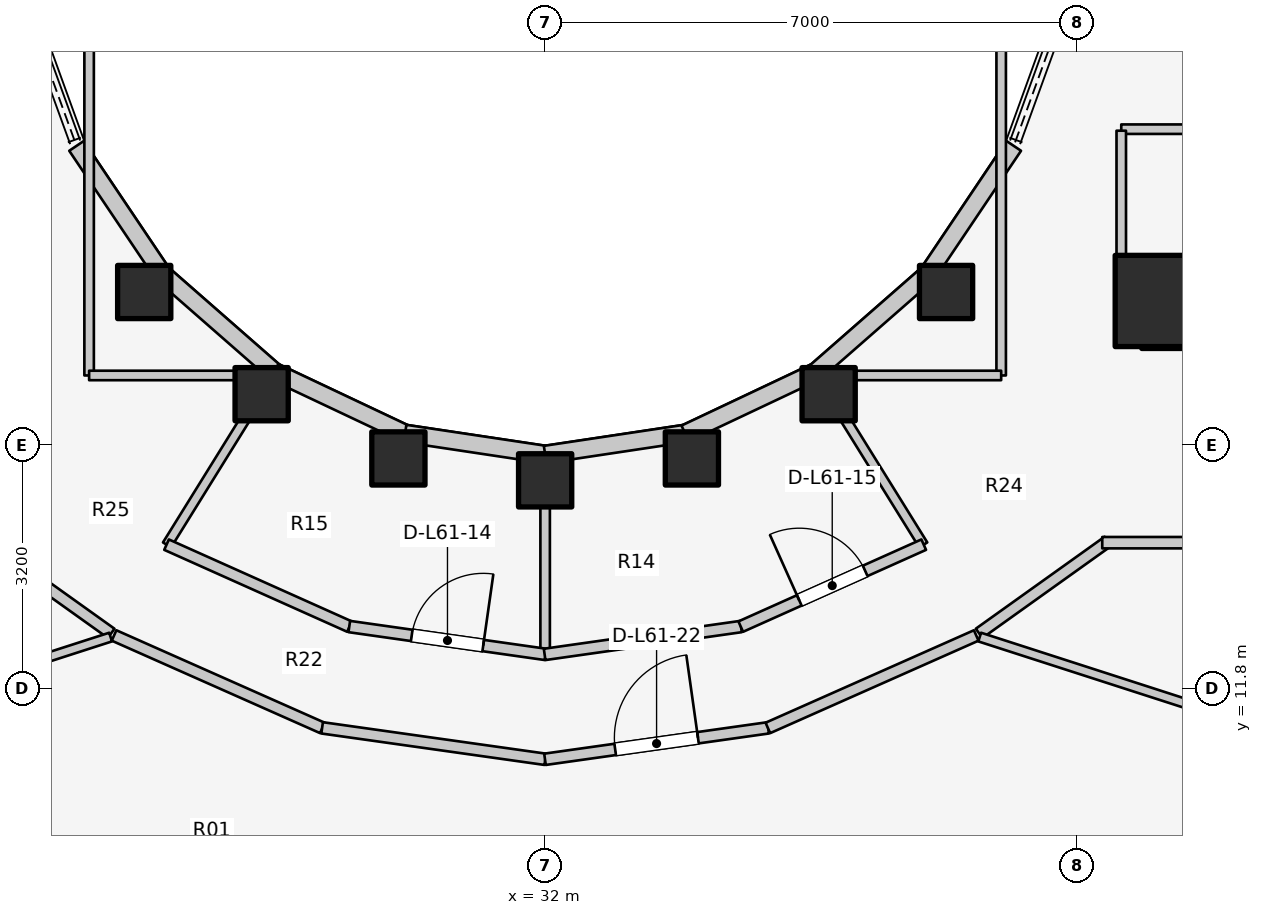
"""IFC4 building model, lengths in metres.
Left out: names, types, materials, properties, quantities, classifications, styles, units other than length and angle.
Written with IfcOpenShell. Run it as: python <this file> out.ifc"""

import sys

from ifc_helpers import new_model, si_unit, direction, frame, frame_2d, origin, origin_2d, place, context, subcontext, project, spatial, rectangle, extrude, element, fill, save


model = new_model("IFC4")
c1 = context("Model", 3, precision=1e-05, world=origin(), true_north=direction((0.0, 1.0)))
c2 = subcontext(c1, "Body", "Model", "MODEL_VIEW")
j1 = project(units=[si_unit("LENGTHUNIT", "METRE"), si_unit("PLANEANGLEUNIT", "RADIAN")], contexts=[c1])
p1 = place(None, origin())
s1 = spatial("IfcSite", under=j1, at=p1, CompositionType="ELEMENT")
p2 = place(p1, origin())
s2 = spatial("IfcBuilding", under=s1, at=p2, CompositionType="ELEMENT")
p3 = place(p2, frame((0.0, 0.0, 201.6)))
s3 = spatial("IfcBuildingStorey", under=s2, at=p3, CompositionType="ELEMENT", Elevation=201.6)
p4 = place(p3, frame((39.85, 16.55, 0.0), z_axis=(0.0, 0.0, 1.0), x_axis=(1.0, 0.0, 0.0)))
e1 = element("IfcWall", 1, at=p4, inside=s3, PredefinedType="SHEAR", context=c2, shape_type="SweptSolid", body=[
    extrude(rectangle(XDim=4.5, YDim=0.55, at=frame_2d((2.25, 0.0))), origin(), (0.0, 0.0, 1.0), 3.1),
])
p5 = place(p3, frame((40.1, 16.9, 0.0), z_axis=(0.0, 0.0, 1.0), x_axis=(1.0, 0.0, 0.0)))
e2 = element("IfcColumn", 2, at=p5, inside=s3, PredefinedType="COLUMN", context=c2, shape_type="SweptSolid", body=[
    extrude(rectangle(XDim=1.2, YDim=1.2, at=origin_2d()), origin(), (0.0, 0.0, 1.0), 3.1),
])
for number, where, z_axis, x_axis in (
    (3, (26.725, 17.018, 0.0), (0.0, 0.0, 1.0), (1.0, 0.0, 0.0)),
    (4, (28.27, 15.673, 0.0), (0.0, 0.0, 1.0), (1.0, 0.0, 0.0)),
    (5, (30.069, 14.828, 0.0), (0.0, 0.0, 1.0), (1.0, 0.0, 0.0)),
    (6, (32.0, 14.54, 0.0), (0.0, 0.0, 1.0), (1.0, 0.0, 0.0)),
    (7, (33.931, 14.828, 0.0), (0.0, 0.0, 1.0), (1.0, 0.0, 0.0)),
    (8, (35.73, 15.673, 0.0), (0.0, 0.0, 1.0), (1.0, 0.0, 0.0)),
    (9, (37.275, 17.018, 0.0), (0.0, 0.0, 1.0), (1.0, 0.0, 0.0)),
):
    element("IfcColumn", number, at=place(p3, frame(where, z_axis=z_axis, x_axis=x_axis)), inside=s3, PredefinedType="COLUMN", context=c2, shape_type="SweptSolid", body=[
        extrude(rectangle(XDim=0.7, YDim=0.7, at=origin_2d()), origin(), (0.0, 0.0, 1.0), 3.1),
    ])
p6 = place(p3, frame((25.834, 18.94, 0.0), z_axis=(0.0, 0.0, 1.0), x_axis=(0.558197800898, -0.829707909492, 0.0)))
e10 = element("IfcWall", 10, at=p6, inside=s3, PredefinedType="STANDARD", context=c2, shape_type="SweptSolid", body=[
    extrude(rectangle(XDim=2.027, YDim=0.23, at=frame_2d((1.013, 0.0))), origin(), (0.0, 0.0, 1.0), 2.16),
])
p7 = place(p3, frame((26.965, 17.258, 0.0), z_axis=(0.0, 0.0, 1.0), x_axis=(0.752576694707, -0.658504607869, 0.0)))
e11 = element("IfcWall", 11, at=p7, inside=s3, PredefinedType="STANDARD", context=c2, shape_type="SweptSolid", body=[
    extrude(rectangle(XDim=1.959, YDim=0.23, at=frame_2d((0.98, 0.0))), origin(), (0.0, 0.0, 1.0), 2.16),
])
p8 = place(p3, frame((28.44, 15.968, 0.0), z_axis=(0.0, 0.0, 1.0), x_axis=(0.904179699603, -0.427152280606, 0.0)))
e12 = element("IfcWall", 12, at=p8, inside=s3, PredefinedType="STANDARD", context=c2, shape_type="SweptSolid", body=[
    extrude(rectangle(XDim=1.899, YDim=0.23, at=frame_2d((0.95, 0.0))), origin(), (0.0, 0.0, 1.0), 2.16),
])
for number, where, z_axis, x_axis in (
    (13, (30.157, 15.157, 0.0), (0.0, 0.0, 1.0), (0.989, -0.149, 0.0)),
    (14, (32.0, 14.88, 0.0), (0.0, 0.0, 1.0), (0.989, 0.149, 0.0)),
):
    element("IfcWall", number, at=place(p3, frame(where, z_axis=z_axis, x_axis=x_axis)), inside=s3, PredefinedType="STANDARD", context=c2, shape_type="SweptSolid", body=[
        extrude(rectangle(XDim=1.864, YDim=0.23, at=frame_2d((0.932, 0.0))), origin(), (0.0, 0.0, 1.0), 2.16),
    ])
p9 = place(p3, frame((33.843, 15.157, 0.0), z_axis=(0.0, 0.0, 1.0), x_axis=(0.904179699603, 0.427152280606, 0.0)))
e15 = element("IfcWall", 15, at=p9, inside=s3, PredefinedType="STANDARD", context=c2, shape_type="SweptSolid", body=[
    extrude(rectangle(XDim=1.899, YDim=0.23, at=frame_2d((0.95, 0.0))), origin(), (0.0, 0.0, 1.0), 2.16),
])
p10 = place(p3, frame((35.56, 15.968, 0.0), z_axis=(0.0, 0.0, 1.0), x_axis=(0.752576694707, 0.658504607869, 0.0)))
e16 = element("IfcWall", 16, at=p10, inside=s3, PredefinedType="STANDARD", context=c2, shape_type="SweptSolid", body=[
    extrude(rectangle(XDim=1.959, YDim=0.23, at=frame_2d((0.98, 0.0))), origin(), (0.0, 0.0, 1.0), 2.16),
])
p11 = place(p3, frame((37.035, 17.258, 0.0), z_axis=(0.0, 0.0, 1.0), x_axis=(0.558197800898, 0.829707909492, 0.0)))
e17 = element("IfcWall", 17, at=p11, inside=s3, PredefinedType="STANDARD", context=c2, shape_type="SweptSolid", body=[
    extrude(rectangle(XDim=2.027, YDim=0.23, at=frame_2d((1.013, 0.0))), origin(), (0.0, 0.0, 1.0), 2.16),
])
p12 = place(p3, frame((39.043, 8.515, 0.0), z_axis=(0.0, 0.0, 1.0), x_axis=(0.965213026382, 0.261464746576, 0.0)))
e18 = element("IfcWall", 18, at=p12, inside=s3, PredefinedType="STANDARD", context=c2, shape_type="SweptSolid", body=[
    extrude(rectangle(XDim=5.001, YDim=0.26, at=frame_2d((2.5, 0.0))), origin(), (0.0, 0.0, 1.0), 2.85),
])
p13 = place(p12, frame((1.75, 0.0, 0.75)))
e19 = element("IfcOpeningElement", 19, at=p13, cuts=e18, PredefinedType="OPENING", context=c2, shape_type="SweptSolid", body=[
    extrude(rectangle(XDim=1.5, YDim=1.6, at=frame_2d((0.75, 0.8))), frame((0.0, 0.14, 0.0), z_axis=(0.0, -1.0, 0.0), x_axis=(1.0, 0.0, 0.0)), (0.0, 0.0, 1.0), 0.28),
])
p14 = place(p3, frame((39.58, 19.16, 0.0), z_axis=(0.0, 0.0, 1.0), x_axis=(1.0, 0.0, 0.0)))
e20 = element("IfcWall", 20, at=p14, inside=s3, PredefinedType="PARTITIONING", context=c2, shape_type="SweptSolid", body=[
    extrude(rectangle(XDim=4.87, YDim=0.125, at=frame_2d((2.435, 0.0))), origin(), (0.0, 0.0, 1.0), 2.12),
])
p15 = place(p14, frame((1.748, 0.0, 0.0)))
e21 = element("IfcOpeningElement", 21, at=p15, cuts=e20, PredefinedType="OPENING", context=c2, shape_type="SweptSolid", body=[
    extrude(rectangle(XDim=0.85, YDim=2.05, at=frame_2d((0.425, 1.025))), frame((0.0, 0.073, 0.0), z_axis=(0.0, -1.0, 0.0), x_axis=(1.0, 0.0, 0.0)), (0.0, 0.0, 1.0), 0.145),
])
p16 = place(p3, frame((39.58, 17.1, 0.0), z_axis=(0.0, 0.0, 1.0), x_axis=(0.0, 1.0, 0.0)))
e22 = element("IfcWall", 22, at=p16, inside=s3, PredefinedType="PARTITIONING", context=c2, shape_type="SweptSolid", body=[
    extrude(rectangle(XDim=2.04, YDim=0.125, at=frame_2d((1.02, 0.0))), origin(), (0.0, 0.0, 1.0), 2.232),
])
p17 = place(p3, frame((28.45, 15.985, 0.0), z_axis=(0.0, 0.0, 1.0), x_axis=(-0.527527080983, -0.849538215049, 0.0)))
e23 = element("IfcWall", 23, at=p17, inside=s3, PredefinedType="PARTITIONING", context=c2, shape_type="SweptSolid", body=[
    extrude(rectangle(XDim=2.701, YDim=0.125, at=frame_2d((1.351, 0.0))), origin(), (0.0, 0.0, 1.0), 2.376),
])
p18 = place(p3, frame((32.0, 14.9, 0.0), z_axis=(0.0, 0.0, 1.0), x_axis=(0.0, -1.0, 0.0)))
e24 = element("IfcWall", 24, at=p18, inside=s3, PredefinedType="PARTITIONING", context=c2, shape_type="SweptSolid", body=[
    extrude(rectangle(XDim=2.65, YDim=0.125, at=frame_2d((1.325, 0.0))), origin(), (0.0, 0.0, 1.0), 2.376),
])
p19 = place(p3, frame((35.55, 15.985, 0.0), z_axis=(0.0, 0.0, 1.0), x_axis=(0.527527080983, -0.849538215049, 0.0)))
e25 = element("IfcWall", 25, at=p19, inside=s3, PredefinedType="PARTITIONING", context=c2, shape_type="SweptSolid", body=[
    extrude(rectangle(XDim=2.701, YDim=0.125, at=frame_2d((1.351, 0.0))), origin(), (0.0, 0.0, 1.0), 2.376),
])
p20 = place(p3, frame((27.019, 13.694, 0.0), z_axis=(0.0, 0.0, 1.0), x_axis=(0.912628408652, -0.408790151203, 0.0)))
e26 = element("IfcWall", 26, at=p20, inside=s3, PredefinedType="PARTITIONING", context=c2, shape_type="SweptSolid", body=[
    extrude(rectangle(XDim=2.638, YDim=0.15, at=frame_2d((1.319, 0.0))), origin(), (0.0, 0.0, 1.0), 2.376),
])
p21 = place(p3, frame((29.423, 12.617, 0.0), z_axis=(0.0, 0.0, 1.0), x_axis=(0.990078185178, -0.140517569133, 0.0)))
e27 = element("IfcWall", 27, at=p21, inside=s3, PredefinedType="PARTITIONING", context=c2, shape_type="SweptSolid", body=[
    extrude(rectangle(XDim=2.61, YDim=0.15, at=frame_2d((1.305, 0.0))), origin(), (0.0, 0.0, 1.0), 2.376),
])
p22 = place(p21, frame((0.83, 0.0, 0.0)))
e28 = element("IfcOpeningElement", 28, at=p22, cuts=e27, PredefinedType="OPENING", context=c2, shape_type="SweptSolid", body=[
    extrude(rectangle(XDim=0.95, YDim=2.1, at=frame_2d((0.475, 1.05))), frame((0.0, 0.085, 0.0), z_axis=(0.0, -1.0, 0.0), x_axis=(1.0, 0.0, 0.0)), (0.0, 0.0, 1.0), 0.17),
])
p23 = place(p3, frame((31.993, 12.25, 0.0), z_axis=(0.0, 0.0, 1.0), x_axis=(0.990078185178, 0.140517569133, 0.0)))
e29 = element("IfcWall", 29, at=p23, inside=s3, PredefinedType="PARTITIONING", context=c2, shape_type="SweptSolid", body=[
    extrude(rectangle(XDim=2.61, YDim=0.15, at=frame_2d((1.305, 0.0))), origin(), (0.0, 0.0, 1.0), 2.376),
])
p24 = place(p3, frame((34.573, 12.616, 0.0), z_axis=(0.0, 0.0, 1.0), x_axis=(0.912628408652, 0.408790151203, 0.0)))
e30 = element("IfcWall", 30, at=p24, inside=s3, PredefinedType="PARTITIONING", context=c2, shape_type="SweptSolid", body=[
    extrude(rectangle(XDim=2.638, YDim=0.15, at=frame_2d((1.319, 0.0))), origin(), (0.0, 0.0, 1.0), 2.376),
])
p25 = place(p24, frame((0.844, 0.0, 0.0)))
e31 = element("IfcOpeningElement", 31, at=p25, cuts=e30, PredefinedType="OPENING", context=c2, shape_type="SweptSolid", body=[
    extrude(rectangle(XDim=0.95, YDim=2.1, at=frame_2d((0.475, 1.05))), frame((0.0, 0.085, 0.0), z_axis=(0.0, -1.0, 0.0), x_axis=(1.0, 0.0, 0.0)), (0.0, 0.0, 1.0), 0.17),
])
p26 = place(p3, frame((26.0, 15.92, 0.0), z_axis=(0.0, 0.0, 1.0), x_axis=(0.0, 1.0, 0.0)))
e32 = element("IfcWall", 32, at=p26, inside=s3, PredefinedType="PARTITIONING", context=c2, shape_type="SweptSolid", body=[
    extrude(rectangle(XDim=4.28, YDim=0.125, at=frame_2d((2.14, 0.0))), origin(), (0.0, 0.0, 1.0), 2.232),
])
p27 = place(p3, frame((26.0, 15.92, 0.0), z_axis=(0.0, 0.0, 1.0), x_axis=(1.0, 0.0, 0.0)))
e33 = element("IfcWall", 33, at=p27, inside=s3, PredefinedType="PARTITIONING", context=c2, shape_type="SweptSolid", body=[
    extrude(rectangle(XDim=2.6, YDim=0.125, at=frame_2d((1.3, 0.0))), origin(), (0.0, 0.0, 1.0), 2.232),
])
p28 = place(p3, frame((38.0, 15.92, 0.0), z_axis=(0.0, 0.0, 1.0), x_axis=(0.0, 1.0, 0.0)))
e34 = element("IfcWall", 34, at=p28, inside=s3, PredefinedType="PARTITIONING", context=c2, shape_type="SweptSolid", body=[
    extrude(rectangle(XDim=4.28, YDim=0.125, at=frame_2d((2.14, 0.0))), origin(), (0.0, 0.0, 1.0), 2.232),
])
p29 = place(p3, frame((35.4, 15.92, 0.0), z_axis=(0.0, 0.0, 1.0), x_axis=(1.0, 0.0, 0.0)))
e35 = element("IfcWall", 35, at=p29, inside=s3, PredefinedType="PARTITIONING", context=c2, shape_type="SweptSolid", body=[
    extrude(rectangle(XDim=2.6, YDim=0.125, at=frame_2d((1.3, 0.0))), origin(), (0.0, 0.0, 1.0), 2.232),
])
for number, where, z_axis, x_axis in (
    (36, (26.29, 12.527, 0.0), (0.0, 0.0, 1.0), (-0.814, 0.581, 0.0)),
    (37, (37.71, 12.527, 0.0), (0.0, 0.0, 1.0), (0.814, 0.581, 0.0)),
):
    element("IfcWall", number, at=place(p3, frame(where, z_axis=z_axis, x_axis=x_axis)), inside=s3, PredefinedType="PARTITIONING", context=c2, shape_type="SweptSolid", body=[
        extrude(rectangle(XDim=2.082, YDim=0.15, at=frame_2d((1.041, 0.0))), origin(), (0.0, 0.0, 1.0), 2.376),
    ])
p30 = place(p3, frame((39.33, 13.72, 0.0), z_axis=(0.0, 0.0, 1.0), x_axis=(1.0, 0.0, 0.0)))
e38 = element("IfcWall", 38, at=p30, inside=s3, PredefinedType="PARTITIONING", context=c2, shape_type="SweptSolid", body=[
    extrude(rectangle(XDim=7.52, YDim=0.15, at=frame_2d((3.76, 0.0))), origin(), (0.0, 0.0, 1.0), 2.376),
])
p31 = place(p30, frame((5.22, 0.0, 0.0)))
e39 = element("IfcOpeningElement", 39, at=p31, cuts=e38, PredefinedType="OPENING", context=c2, shape_type="SweptSolid", body=[
    extrude(rectangle(XDim=0.9, YDim=2.1, at=frame_2d((0.45, 1.05))), frame((0.0, 0.085, 0.0), z_axis=(0.0, -1.0, 0.0), x_axis=(1.0, 0.0, 0.0)), (0.0, 0.0, 1.0), 0.17),
])
for number, where, z_axis, x_axis in (
    (40, (26.283, 12.478, 0.0), (0.0, 0.0, 1.0), (-0.952, -0.307, 0.0)),
    (41, (37.717, 12.478, 0.0), (0.0, 0.0, 1.0), (0.952, -0.307, 0.0)),
):
    element("IfcWall", number, at=place(p3, frame(where, z_axis=z_axis, x_axis=x_axis)), inside=s3, PredefinedType="MOVABLE", context=c2, shape_type="SweptSolid", body=[
        extrude(rectangle(XDim=5.934, YDim=0.12, at=frame_2d((2.967, 0.0))), origin(), (0.0, 0.0, 1.0), 2.376),
    ])
p32 = place(p3, frame((26.328, 12.499, 0.0), z_axis=(0.0, 0.0, 1.0), x_axis=(0.914043013008, -0.4056172708, 0.0)))
e42 = element("IfcWall", 42, at=p32, inside=s3, PredefinedType="PARTITIONING", context=c2, shape_type="SweptSolid", body=[
    extrude(rectangle(XDim=2.999, YDim=0.15, at=frame_2d((1.5, 0.0))), origin(), (0.0, 0.0, 1.0), 2.376),
])
p33 = place(p3, frame((29.066, 11.284, 0.0), z_axis=(0.0, 0.0, 1.0), x_axis=(0.990214490255, -0.139553800697, 0.0)))
e43 = element("IfcWall", 43, at=p33, inside=s3, PredefinedType="PARTITIONING", context=c2, shape_type="SweptSolid", body=[
    extrude(rectangle(XDim=2.965, YDim=0.15, at=frame_2d((1.483, 0.0))), origin(), (0.0, 0.0, 1.0), 2.376),
])
p34 = place(p3, frame((31.998, 10.87, 0.0), z_axis=(0.0, 0.0, 1.0), x_axis=(0.990214490255, 0.139553800697, 0.0)))
e44 = element("IfcWall", 44, at=p34, inside=s3, PredefinedType="PARTITIONING", context=c2, shape_type="SweptSolid", body=[
    extrude(rectangle(XDim=2.965, YDim=0.15, at=frame_2d((1.483, 0.0))), origin(), (0.0, 0.0, 1.0), 2.376),
])
p35 = place(p34, frame((0.933, 0.0, 0.0)))
e45 = element("IfcOpeningElement", 45, at=p35, cuts=e44, PredefinedType="OPENING", context=c2, shape_type="SweptSolid", body=[
    extrude(rectangle(XDim=1.1, YDim=2.1, at=frame_2d((0.55, 1.05))), frame((0.0, 0.085, 0.0), z_axis=(0.0, -1.0, 0.0), x_axis=(1.0, 0.0, 0.0)), (0.0, 0.0, 1.0), 0.17),
])
p36 = place(p3, frame((34.93, 11.283, 0.0), z_axis=(0.0, 0.0, 1.0), x_axis=(0.914043013008, 0.4056172708, 0.0)))
e46 = element("IfcWall", 46, at=p36, inside=s3, PredefinedType="PARTITIONING", context=c2, shape_type="SweptSolid", body=[
    extrude(rectangle(XDim=2.999, YDim=0.15, at=frame_2d((1.5, 0.0))), origin(), (0.0, 0.0, 1.0), 2.376),
])
p37 = place(p22, origin())
e47 = element("IfcDoor", 47, at=p37, inside=s3, OperationType="SINGLE_SWING_RIGHT", PredefinedType="DOOR", context=c2, shape_type="SweptSolid", body=[
    extrude(rectangle(XDim=0.95, YDim=2.1, at=frame_2d((0.475, 1.05))), frame((0.0, 0.025, 0.0), z_axis=(0.0, -1.0, 0.0), x_axis=(1.0, 0.0, 0.0)), (0.0, 0.0, 1.0), 0.05),
])
fill(e28, e47)
p38 = place(p25, origin())
e48 = element("IfcDoor", 48, at=p38, inside=s3, OperationType="SINGLE_SWING_LEFT", PredefinedType="DOOR", context=c2, shape_type="SweptSolid", body=[
    extrude(rectangle(XDim=0.95, YDim=2.1, at=frame_2d((0.475, 1.05))), frame((0.0, 0.025, 0.0), z_axis=(0.0, -1.0, 0.0), x_axis=(1.0, 0.0, 0.0)), (0.0, 0.0, 1.0), 0.05),
])
fill(e31, e48)
p39 = place(p35, origin())
e49 = element("IfcDoor", 49, at=p39, inside=s3, OperationType="SINGLE_SWING_RIGHT", PredefinedType="DOOR", context=c2, shape_type="SweptSolid", body=[
    extrude(rectangle(XDim=1.1, YDim=2.1, at=frame_2d((0.55, 1.05))), frame((0.0, 0.025, 0.0), z_axis=(0.0, -1.0, 0.0), x_axis=(1.0, 0.0, 0.0)), (0.0, 0.0, 1.0), 0.05),
])
fill(e45, e49)
save(model, sys.argv[1])
